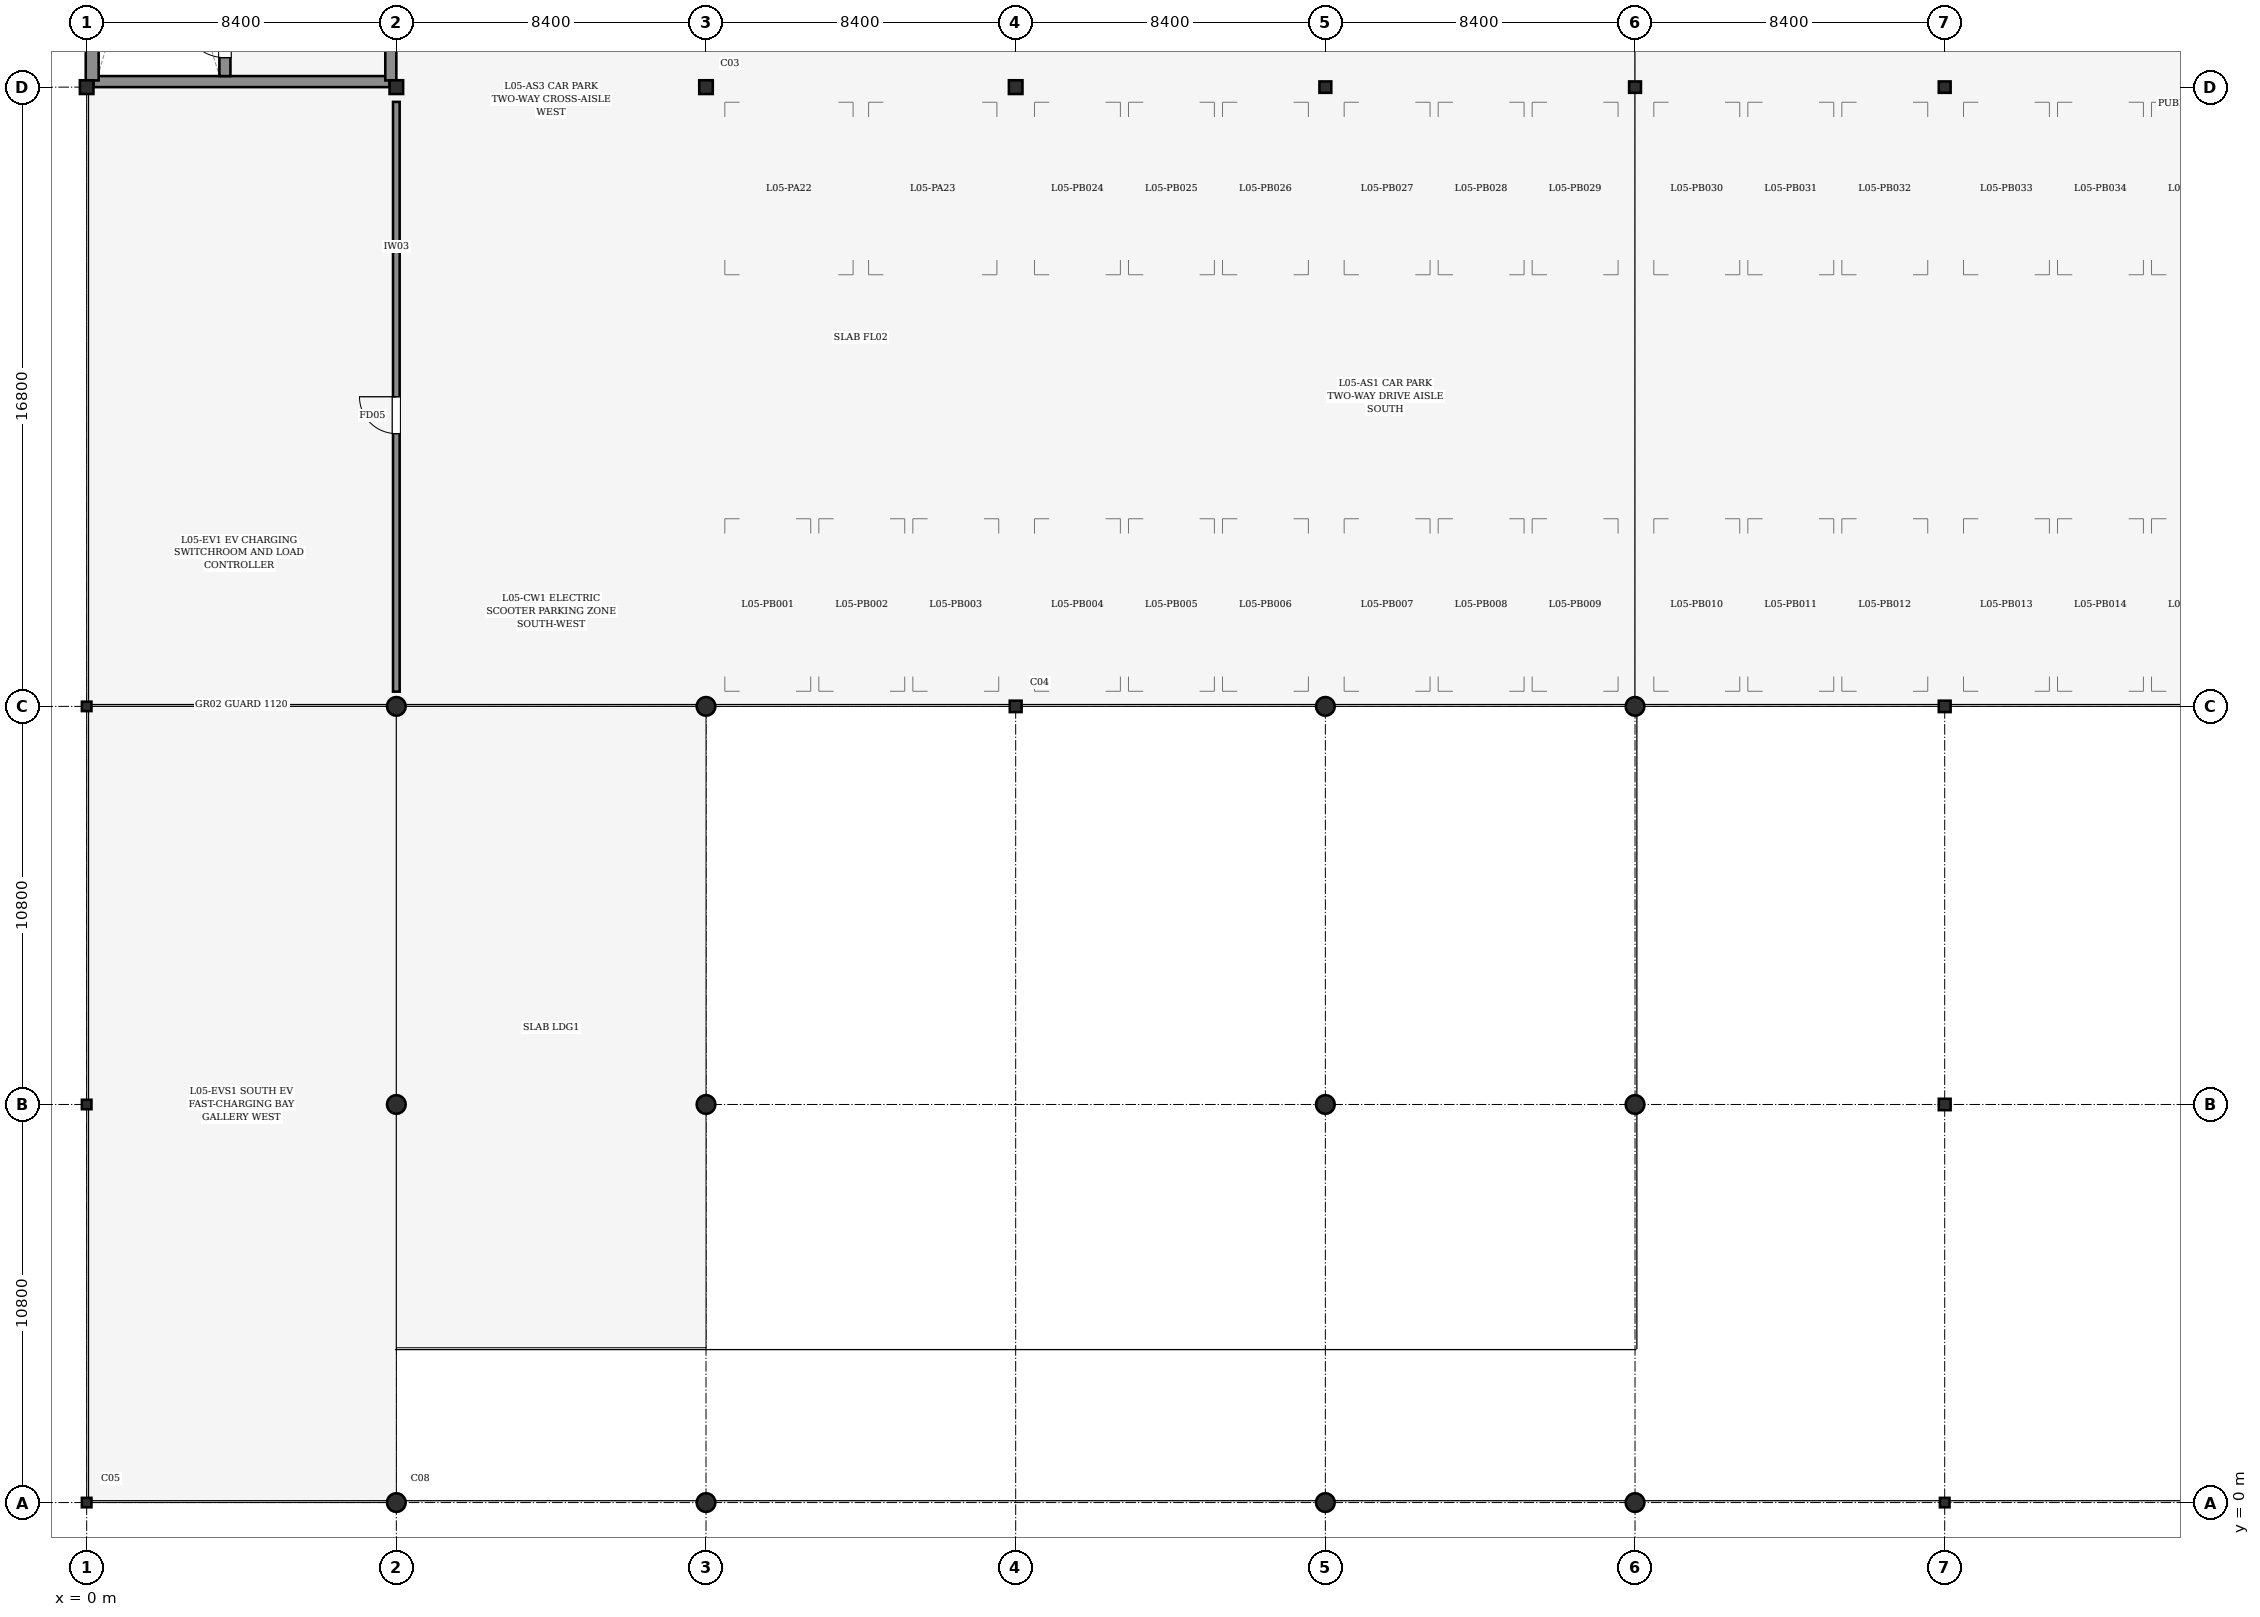
"""IFC4 building model, lengths in metres.
Left out: names, types, materials, properties, quantities, classifications, styles, units other than length and angle.
Written with IfcOpenShell. Run it as: python <this file> out.ifc"""

import sys

from ifc_helpers import new_model, si_unit, direction, frame, frame_2d, origin, origin_2d, place, context, subcontext, project, spatial, rectangle, hollow_circle, i_section, extrude, element, fill, save


model = new_model("IFC4")
c1 = context("Model", 3, precision=1e-05, world=origin(), true_north=direction((0.0, 1.0)))
c2 = subcontext(c1, "Body", "Model", "MODEL_VIEW")
j1 = project(units=[si_unit("LENGTHUNIT", "METRE"), si_unit("PLANEANGLEUNIT", "RADIAN")], contexts=[c1])
p1 = place(None, origin())
s1 = spatial("IfcSite", under=j1, at=p1, CompositionType="ELEMENT")
p2 = place(p1, origin())
s2 = spatial("IfcBuilding", under=s1, at=p2, CompositionType="ELEMENT")
p3 = place(p2, frame((0.0, 0.0, 19.8)))
s3 = spatial("IfcBuildingStorey", under=s2, at=p3, CompositionType="ELEMENT", Elevation=19.8)
for number, where, z_axis, x_axis in (
    (1, (0.0, 0.0, 0.0), (0.0, 0.0, 1.0), (1.0, 0.0, 0.0)),
    (2, (0.0, 10.8, 0.0), (0.0, 0.0, 1.0), (1.0, 0.0, 0.0)),
    (3, (0.0, 21.6, 0.0), (0.0, 0.0, 1.0), (1.0, 0.0, 0.0)),
):
    element("IfcColumn", number, at=place(p3, frame(where, z_axis=z_axis, x_axis=x_axis)), inside=s3, PredefinedType="COLUMN", context=c2, shape_type="SweptSolid", body=[
        extrude(i_section(OverallWidth=0.256, OverallDepth=0.26, WebThickness=0.01, FlangeThickness=0.017, FilletRadius=0.013, at=origin_2d()), origin(), (0.0, 0.0, 1.0), 3.6),
    ])
p4 = place(p3, frame((0.0, 38.4, 0.0), z_axis=(0.0, 0.0, 1.0), x_axis=(1.0, 0.0, 0.0)))
e4 = element("IfcColumn", 4, at=p4, inside=s3, PredefinedType="COLUMN", context=c2, shape_type="SweptSolid", body=[
    extrude(i_section(OverallWidth=0.373, OverallDepth=0.368, WebThickness=0.014, FlangeThickness=0.024, FilletRadius=0.015, at=origin_2d()), origin(), (0.0, 0.0, 1.0), 3.6),
])
for number, where, z_axis, x_axis in (
    (5, (8.4, 0.0, 0.0), (0.0, 0.0, 1.0), (1.0, 0.0, 0.0)),
    (6, (8.4, 10.8, 0.0), (0.0, 0.0, 1.0), (1.0, 0.0, 0.0)),
    (7, (8.4, 21.6, 0.0), (0.0, 0.0, 1.0), (1.0, 0.0, 0.0)),
):
    element("IfcColumn", number, at=place(p3, frame(where, z_axis=z_axis, x_axis=x_axis)), inside=s3, PredefinedType="COLUMN", context=c2, shape_type="SweptSolid", body=[
        extrude(hollow_circle(Radius=0.254, WallThickness=0.016, at=origin_2d()), origin(), (0.0, 0.0, 1.0), 3.6),
    ])
p5 = place(p3, frame((8.4, 38.4, 0.0), z_axis=(0.0, 0.0, 1.0), x_axis=(1.0, 0.0, 0.0)))
e8 = element("IfcColumn", 8, at=p5, inside=s3, PredefinedType="COLUMN", context=c2, shape_type="SweptSolid", body=[
    extrude(i_section(OverallWidth=0.373, OverallDepth=0.368, WebThickness=0.014, FlangeThickness=0.024, FilletRadius=0.015, at=origin_2d()), origin(), (0.0, 0.0, 1.0), 3.6),
])
for number, where, z_axis, x_axis in (
    (9, (16.8, 0.0, 0.0), (0.0, 0.0, 1.0), (1.0, 0.0, 0.0)),
    (10, (16.8, 10.8, 0.0), (0.0, 0.0, 1.0), (1.0, 0.0, 0.0)),
    (11, (16.8, 21.6, 0.0), (0.0, 0.0, 1.0), (1.0, 0.0, 0.0)),
):
    element("IfcColumn", number, at=place(p3, frame(where, z_axis=z_axis, x_axis=x_axis)), inside=s3, PredefinedType="COLUMN", context=c2, shape_type="SweptSolid", body=[
        extrude(hollow_circle(Radius=0.254, WallThickness=0.016, at=origin_2d()), origin(), (0.0, 0.0, 1.0), 3.6),
    ])
p6 = place(p3, frame((16.8, 38.4, 0.0), z_axis=(0.0, 0.0, 1.0), x_axis=(1.0, 0.0, 0.0)))
e12 = element("IfcColumn", 12, at=p6, inside=s3, PredefinedType="COLUMN", context=c2, shape_type="SweptSolid", body=[
    extrude(i_section(OverallWidth=0.373, OverallDepth=0.368, WebThickness=0.014, FlangeThickness=0.024, FilletRadius=0.015, at=origin_2d()), origin(), (0.0, 0.0, 1.0), 3.6),
])
p7 = place(p3, frame((25.2, 21.6, 0.0), z_axis=(0.0, 0.0, 1.0), x_axis=(1.0, 0.0, 0.0)))
e13 = element("IfcColumn", 13, at=p7, inside=s3, PredefinedType="COLUMN", context=c2, shape_type="SweptSolid", body=[
    extrude(i_section(OverallWidth=0.309, OverallDepth=0.321, WebThickness=0.014, FlangeThickness=0.022, FilletRadius=0.015, at=origin_2d()), origin(), (0.0, 0.0, 1.0), 3.6),
])
p8 = place(p3, frame((25.2, 38.4, 0.0), z_axis=(0.0, 0.0, 1.0), x_axis=(1.0, 0.0, 0.0)))
e14 = element("IfcColumn", 14, at=p8, inside=s3, PredefinedType="COLUMN", context=c2, shape_type="SweptSolid", body=[
    extrude(i_section(OverallWidth=0.373, OverallDepth=0.368, WebThickness=0.014, FlangeThickness=0.024, FilletRadius=0.015, at=origin_2d()), origin(), (0.0, 0.0, 1.0), 3.6),
])
for number, where, z_axis, x_axis in (
    (15, (33.6, 0.0, 0.0), (0.0, 0.0, 1.0), (1.0, 0.0, 0.0)),
    (16, (33.6, 10.8, 0.0), (0.0, 0.0, 1.0), (1.0, 0.0, 0.0)),
    (17, (33.6, 21.6, 0.0), (0.0, 0.0, 1.0), (1.0, 0.0, 0.0)),
):
    element("IfcColumn", number, at=place(p3, frame(where, z_axis=z_axis, x_axis=x_axis)), inside=s3, PredefinedType="COLUMN", context=c2, shape_type="SweptSolid", body=[
        extrude(hollow_circle(Radius=0.254, WallThickness=0.016, at=origin_2d()), origin(), (0.0, 0.0, 1.0), 3.6),
    ])
p9 = place(p3, frame((33.6, 38.4, 0.0), z_axis=(0.0, 0.0, 1.0), x_axis=(1.0, 0.0, 0.0)))
e18 = element("IfcColumn", 18, at=p9, inside=s3, PredefinedType="COLUMN", context=c2, shape_type="SweptSolid", body=[
    extrude(i_section(OverallWidth=0.309, OverallDepth=0.321, WebThickness=0.014, FlangeThickness=0.022, FilletRadius=0.015, at=origin_2d()), origin(), (0.0, 0.0, 1.0), 3.6),
])
for number, where, z_axis, x_axis in (
    (19, (42.0, 0.0, 0.0), (0.0, 0.0, 1.0), (1.0, 0.0, 0.0)),
    (20, (42.0, 10.8, 0.0), (0.0, 0.0, 1.0), (1.0, 0.0, 0.0)),
    (21, (42.0, 21.6, 0.0), (0.0, 0.0, 1.0), (1.0, 0.0, 0.0)),
):
    element("IfcColumn", number, at=place(p3, frame(where, z_axis=z_axis, x_axis=x_axis)), inside=s3, PredefinedType="COLUMN", context=c2, shape_type="SweptSolid", body=[
        extrude(hollow_circle(Radius=0.254, WallThickness=0.016, at=origin_2d()), origin(), (0.0, 0.0, 1.0), 3.6),
    ])
p10 = place(p3, frame((42.0, 38.4, 0.0), z_axis=(0.0, 0.0, 1.0), x_axis=(1.0, 0.0, 0.0)))
e22 = element("IfcColumn", 22, at=p10, inside=s3, PredefinedType="COLUMN", context=c2, shape_type="SweptSolid", body=[
    extrude(i_section(OverallWidth=0.309, OverallDepth=0.321, WebThickness=0.014, FlangeThickness=0.022, FilletRadius=0.015, at=origin_2d()), origin(), (0.0, 0.0, 1.0), 3.6),
])
p11 = place(p3, frame((50.4, 0.0, 0.0), z_axis=(0.0, 0.0, 1.0), x_axis=(1.0, 0.0, 0.0)))
e23 = element("IfcColumn", 23, at=p11, inside=s3, PredefinedType="COLUMN", context=c2, shape_type="SweptSolid", body=[
    extrude(i_section(OverallWidth=0.256, OverallDepth=0.26, WebThickness=0.01, FlangeThickness=0.017, FilletRadius=0.013, at=origin_2d()), origin(), (0.0, 0.0, 1.0), 3.6),
])
for number, where, z_axis, x_axis in (
    (24, (50.4, 10.8, 0.0), (0.0, 0.0, 1.0), (1.0, 0.0, 0.0)),
    (25, (50.4, 21.6, 0.0), (0.0, 0.0, 1.0), (1.0, 0.0, 0.0)),
    (26, (50.4, 38.4, 0.0), (0.0, 0.0, 1.0), (1.0, 0.0, 0.0)),
):
    element("IfcColumn", number, at=place(p3, frame(where, z_axis=z_axis, x_axis=x_axis)), inside=s3, PredefinedType="COLUMN", context=c2, shape_type="SweptSolid", body=[
        extrude(i_section(OverallWidth=0.309, OverallDepth=0.321, WebThickness=0.014, FlangeThickness=0.022, FilletRadius=0.015, at=origin_2d()), origin(), (0.0, 0.0, 1.0), 3.6),
    ])
p12 = place(p3, frame((0.185, 38.55, 0.0), z_axis=(0.0, 0.0, 1.0), x_axis=(1.0, 0.0, 0.0)))
e27 = element("IfcWall", 27, at=p12, inside=s3, PredefinedType="SHEAR", context=c2, shape_type="SweptSolid", body=[
    extrude(rectangle(XDim=8.031, YDim=0.3, at=frame_2d((4.016, 0.0))), origin(), (0.0, 0.0, 1.0), 3.38),
])
p13 = place(p3, frame((0.15, 38.582, 0.0), z_axis=(0.0, 0.0, 1.0), x_axis=(0.0, 1.0, 0.0)))
e28 = element("IfcWall", 28, at=p13, inside=s3, PredefinedType="SHEAR", context=c2, shape_type="SweptSolid", body=[
    extrude(rectangle(XDim=16.436, YDim=0.35, at=frame_2d((8.218, 0.0))), origin(), (0.0, 0.0, 1.0), 3.38),
])
p14 = place(p3, frame((8.25, 38.582, 0.0), z_axis=(0.0, 0.0, 1.0), x_axis=(0.0, 1.0, 0.0)))
e29 = element("IfcWall", 29, at=p14, inside=s3, PredefinedType="SHEAR", context=c2, shape_type="SweptSolid", body=[
    extrude(rectangle(XDim=16.436, YDim=0.3, at=frame_2d((8.218, 0.0))), origin(), (0.0, 0.0, 1.0), 3.38),
])
p15 = place(p14, frame((5.668, 0.0, 0.0)))
e30 = element("IfcOpeningElement", 30, at=p15, cuts=e29, PredefinedType="OPENING", context=c2, shape_type="SweptSolid", body=[
    extrude(rectangle(XDim=1.3, YDim=2.2, at=frame_2d((0.65, 1.1))), frame((0.0, 0.16, 0.0), z_axis=(0.0, -1.0, 0.0), x_axis=(1.0, 0.0, 0.0)), (0.0, 0.0, 1.0), 0.32),
])
p16 = place(p3, frame((3.75, 38.7, 0.0), z_axis=(0.0, 0.0, 1.0), x_axis=(0.0, 1.0, 0.0)))
e31 = element("IfcWall", 31, at=p16, inside=s3, PredefinedType="SHEAR", context=c2, shape_type="SweptSolid", body=[
    extrude(rectangle(XDim=16.2, YDim=0.3, at=frame_2d((8.1, 0.0))), origin(), (0.0, 0.0, 1.0), 3.38),
])
p17 = place(p16, frame((0.5, 0.0, 0.0)))
e32 = element("IfcOpeningElement", 32, at=p17, cuts=e31, PredefinedType="OPENING", context=c2, shape_type="SweptSolid", body=[
    extrude(rectangle(XDim=1.15, YDim=2.15, at=frame_2d((0.575, 1.075))), frame((0.0, 0.16, 0.0), z_axis=(0.0, -1.0, 0.0), x_axis=(1.0, 0.0, 0.0)), (0.0, 0.0, 1.0), 0.32),
])
p18 = place(p3, frame((8.4, 22.0, 0.0), z_axis=(0.0, 0.0, 1.0), x_axis=(0.0, 1.0, 0.0)))
e33 = element("IfcWall", 33, at=p18, inside=s3, PredefinedType="PARTITIONING", context=c2, shape_type="SweptSolid", body=[
    extrude(rectangle(XDim=16.0, YDim=0.18, at=frame_2d((8.0, 0.0))), origin(), (0.0, 0.0, 1.0), 2.425),
])
p19 = place(p18, frame((7.0, 0.0, 0.0)))
e34 = element("IfcOpeningElement", 34, at=p19, cuts=e33, PredefinedType="OPENING", context=c2, shape_type="SweptSolid", body=[
    extrude(rectangle(XDim=1.0, YDim=2.15, at=frame_2d((0.5, 1.075))), frame((0.0, 0.1, 0.0), z_axis=(0.0, -1.0, 0.0), x_axis=(1.0, 0.0, 0.0)), (0.0, 0.0, 1.0), 0.2),
])
p20 = place(p17, frame((1.15, 0.0, 0.0), z_axis=(0.0, 0.0, 1.0), x_axis=(-1.0, 0.0, 0.0)))
e35 = element("IfcDoor", 35, at=p20, inside=s3, OperationType="SINGLE_SWING_LEFT", PredefinedType="DOOR", context=c2, shape_type="SweptSolid", body=[
    extrude(rectangle(XDim=1.15, YDim=2.15, at=frame_2d((0.575, 1.075))), frame((0.0, 0.025, 0.0), z_axis=(0.0, -1.0, 0.0), x_axis=(1.0, 0.0, 0.0)), (0.0, 0.0, 1.0), 0.05),
])
fill(e32, e35)
p21 = place(p19, origin())
e36 = element("IfcDoor", 36, at=p21, inside=s3, OperationType="SINGLE_SWING_RIGHT", PredefinedType="DOOR", context=c2, shape_type="SweptSolid", body=[
    extrude(rectangle(XDim=1.0, YDim=2.15, at=frame_2d((0.5, 1.075))), frame((0.0, 0.025, 0.0), z_axis=(0.0, -1.0, 0.0), x_axis=(1.0, 0.0, 0.0)), (0.0, 0.0, 1.0), 0.05),
])
fill(e34, e36)
save(model, sys.argv[1])
